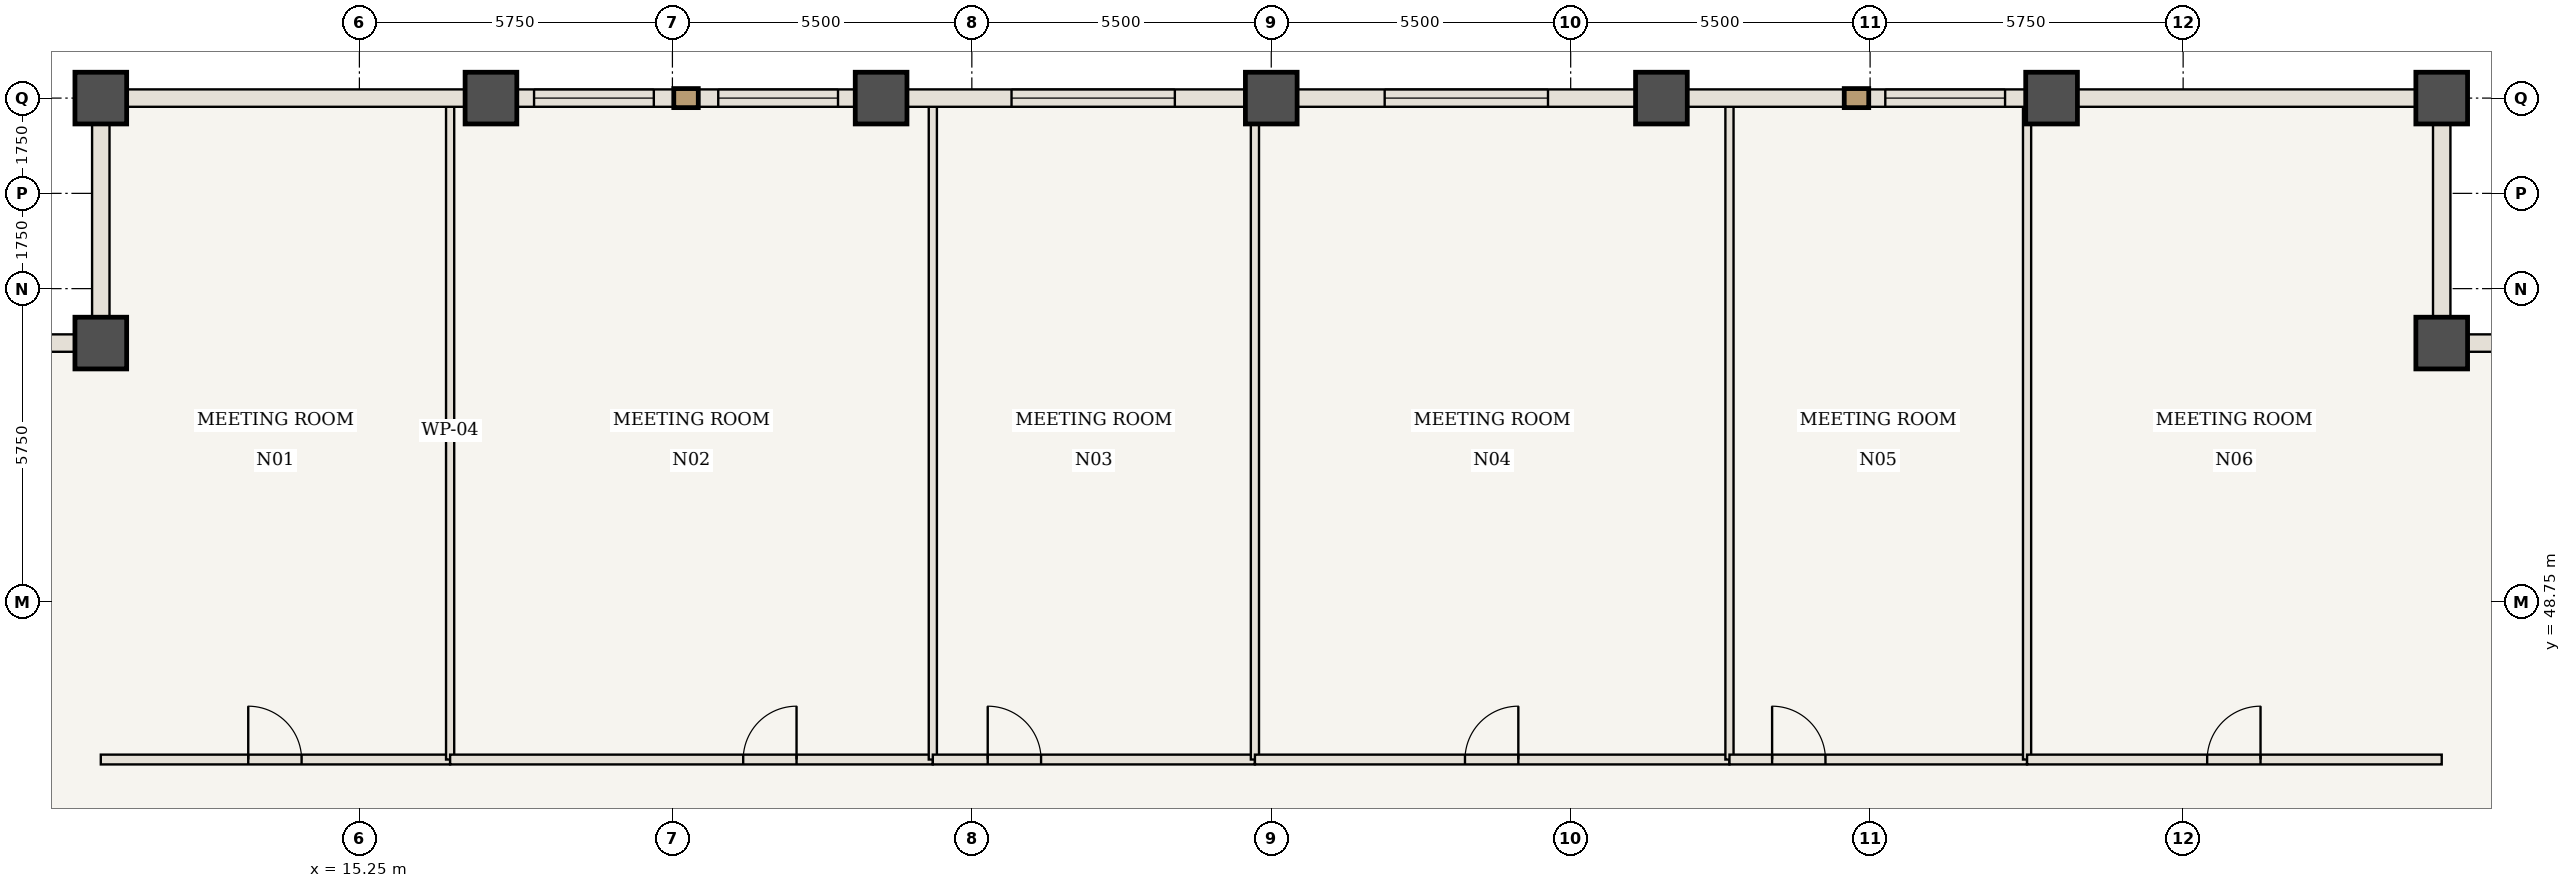
"""IFC4 building model, lengths in metres.
Left out: names, types, materials, properties, quantities, classifications, styles, units other than length and angle.
Written with IfcOpenShell. Run it as: python <this file> out.ifc"""

import sys

from ifc_helpers import new_model, si_unit, direction, frame, frame_2d, origin, origin_2d, place, context, subcontext, project, spatial, rectangle, extrude, element, fill, save


model = new_model("IFC4")
c1 = context("Model", 3, precision=1e-05, world=origin(), true_north=direction((0.0, 1.0)))
c2 = subcontext(c1, "Body", "Model", "MODEL_VIEW")
j1 = project(units=[si_unit("LENGTHUNIT", "METRE"), si_unit("PLANEANGLEUNIT", "RADIAN")], contexts=[c1])
p1 = place(None, origin())
s1 = spatial("IfcSite", under=j1, at=p1, CompositionType="ELEMENT")
p2 = place(p1, origin())
s2 = spatial("IfcBuilding", under=s1, at=p2, CompositionType="ELEMENT")
p3 = place(p2, frame((0.0, 0.0, 168.35)))
s3 = spatial("IfcBuildingStorey", under=s2, at=p3, CompositionType="ELEMENT", Elevation=168.35)
for number, where, z_axis, x_axis in (
    (1, (53.5, 53.5, 0.0), (0.0, 0.0, 1.0), (1.0, 0.0, 0.0)),
    (2, (53.5, 58.0, 0.0), (0.0, 0.0, 1.0), (1.0, 0.0, 0.0)),
    (3, (10.5, 58.0, 0.0), (0.0, 0.0, 1.0), (1.0, 0.0, 0.0)),
    (4, (10.5, 53.5, 0.0), (0.0, 0.0, 1.0), (1.0, 0.0, 0.0)),
    (5, (17.667, 58.0, 0.0), (0.0, 0.0, 1.0), (1.0, 0.0, 0.0)),
    (6, (24.833, 58.0, 0.0), (0.0, 0.0, 1.0), (1.0, 0.0, 0.0)),
    (7, (32.0, 58.0, 0.0), (0.0, 0.0, 1.0), (1.0, 0.0, 0.0)),
    (8, (39.167, 58.0, 0.0), (0.0, 0.0, 1.0), (1.0, 0.0, 0.0)),
    (9, (46.333, 58.0, 0.0), (0.0, 0.0, 1.0), (1.0, 0.0, 0.0)),
):
    element("IfcColumn", number, at=place(p3, frame(where, z_axis=z_axis, x_axis=x_axis)), inside=s3, PredefinedType="COLUMN", context=c2, shape_type="SweptSolid", body=[
        extrude(rectangle(XDim=0.95, YDim=0.95, at=origin_2d()), origin(), (0.0, 0.0, 1.0), 3.85),
    ])
p4 = place(p3, frame((10.5, 45.85, 0.0), z_axis=(0.0, 0.0, 1.0), x_axis=(1.0, 0.0, 0.0)))
e10 = element("IfcWall", 10, at=p4, inside=s3, PredefinedType="STANDARD", context=c2, shape_type="SweptSolid", body=[
    extrude(rectangle(XDim=6.417, YDim=0.18, at=frame_2d((3.208, 0.0))), origin(), (0.0, 0.0, 1.0), 3.685),
])
p5 = place(p4, frame((2.708, 0.0, 0.0)))
e11 = element("IfcOpeningElement", 11, at=p5, cuts=e10, PredefinedType="OPENING", context=c2, shape_type="SweptSolid", body=[
    extrude(rectangle(XDim=0.98, YDim=2.2, at=frame_2d((0.49, 1.1))), frame((0.0, 0.1, 0.0), z_axis=(0.0, -1.0, 0.0), x_axis=(1.0, 0.0, 0.0)), (0.0, 0.0, 1.0), 0.2),
])
p6 = place(p3, frame((16.917, 45.85, 0.0), z_axis=(0.0, 0.0, 1.0), x_axis=(0.0, 1.0, 0.0)))
e12 = element("IfcWall", 12, at=p6, inside=s3, PredefinedType="STANDARD", context=c2, shape_type="SweptSolid", body=[
    extrude(rectangle(XDim=12.09, YDim=0.15, at=frame_2d((6.045, 0.0))), origin(), (0.0, 0.0, 1.0), 3.685),
])
p7 = place(p3, frame((16.917, 45.85, 0.0), z_axis=(0.0, 0.0, 1.0), x_axis=(1.0, 0.0, 0.0)))
e13 = element("IfcWall", 13, at=p7, inside=s3, PredefinedType="STANDARD", context=c2, shape_type="SweptSolid", body=[
    extrude(rectangle(XDim=8.866, YDim=0.18, at=frame_2d((4.433, 0.0))), origin(), (0.0, 0.0, 1.0), 3.685),
])
p8 = place(p7, frame((5.383, 0.0, 0.0)))
e14 = element("IfcOpeningElement", 14, at=p8, cuts=e13, PredefinedType="OPENING", context=c2, shape_type="SweptSolid", body=[
    extrude(rectangle(XDim=0.98, YDim=2.2, at=frame_2d((0.49, 1.1))), frame((0.0, 0.1, 0.0), z_axis=(0.0, -1.0, 0.0), x_axis=(1.0, 0.0, 0.0)), (0.0, 0.0, 1.0), 0.2),
])
p9 = place(p3, frame((25.783, 45.85, 0.0), z_axis=(0.0, 0.0, 1.0), x_axis=(0.0, 1.0, 0.0)))
e15 = element("IfcWall", 15, at=p9, inside=s3, PredefinedType="STANDARD", context=c2, shape_type="SweptSolid", body=[
    extrude(rectangle(XDim=12.09, YDim=0.15, at=frame_2d((6.045, 0.0))), origin(), (0.0, 0.0, 1.0), 3.685),
])
p10 = place(p3, frame((25.783, 45.85, 0.0), z_axis=(0.0, 0.0, 1.0), x_axis=(1.0, 0.0, 0.0)))
e16 = element("IfcWall", 16, at=p10, inside=s3, PredefinedType="STANDARD", context=c2, shape_type="SweptSolid", body=[
    extrude(rectangle(XDim=5.917, YDim=0.18, at=frame_2d((2.958, 0.0))), origin(), (0.0, 0.0, 1.0), 3.685),
])
p11 = place(p10, frame((1.008, 0.0, 0.0)))
e17 = element("IfcOpeningElement", 17, at=p11, cuts=e16, PredefinedType="OPENING", context=c2, shape_type="SweptSolid", body=[
    extrude(rectangle(XDim=0.98, YDim=2.2, at=frame_2d((0.49, 1.1))), frame((0.0, 0.1, 0.0), z_axis=(0.0, -1.0, 0.0), x_axis=(1.0, 0.0, 0.0)), (0.0, 0.0, 1.0), 0.2),
])
p12 = place(p3, frame((31.7, 45.85, 0.0), z_axis=(0.0, 0.0, 1.0), x_axis=(0.0, 1.0, 0.0)))
e18 = element("IfcWall", 18, at=p12, inside=s3, PredefinedType="STANDARD", context=c2, shape_type="SweptSolid", body=[
    extrude(rectangle(XDim=12.09, YDim=0.15, at=frame_2d((6.045, 0.0))), origin(), (0.0, 0.0, 1.0), 3.685),
])
p13 = place(p3, frame((31.7, 45.85, 0.0), z_axis=(0.0, 0.0, 1.0), x_axis=(1.0, 0.0, 0.0)))
e19 = element("IfcWall", 19, at=p13, inside=s3, PredefinedType="STANDARD", context=c2, shape_type="SweptSolid", body=[
    extrude(rectangle(XDim=8.717, YDim=0.18, at=frame_2d((4.358, 0.0))), origin(), (0.0, 0.0, 1.0), 3.685),
])
p14 = place(p13, frame((3.858, 0.0, 0.0)))
e20 = element("IfcOpeningElement", 20, at=p14, cuts=e19, PredefinedType="OPENING", context=c2, shape_type="SweptSolid", body=[
    extrude(rectangle(XDim=0.98, YDim=2.2, at=frame_2d((0.49, 1.1))), frame((0.0, 0.1, 0.0), z_axis=(0.0, -1.0, 0.0), x_axis=(1.0, 0.0, 0.0)), (0.0, 0.0, 1.0), 0.2),
])
p15 = place(p3, frame((40.417, 45.85, 0.0), z_axis=(0.0, 0.0, 1.0), x_axis=(0.0, 1.0, 0.0)))
e21 = element("IfcWall", 21, at=p15, inside=s3, PredefinedType="STANDARD", context=c2, shape_type="SweptSolid", body=[
    extrude(rectangle(XDim=12.09, YDim=0.15, at=frame_2d((6.045, 0.0))), origin(), (0.0, 0.0, 1.0), 3.685),
])
p16 = place(p3, frame((40.417, 45.85, 0.0), z_axis=(0.0, 0.0, 1.0), x_axis=(1.0, 0.0, 0.0)))
e22 = element("IfcWall", 22, at=p16, inside=s3, PredefinedType="STANDARD", context=c2, shape_type="SweptSolid", body=[
    extrude(rectangle(XDim=5.467, YDim=0.18, at=frame_2d((2.733, 0.0))), origin(), (0.0, 0.0, 1.0), 3.685),
])
p17 = place(p16, frame((0.783, 0.0, 0.0)))
e23 = element("IfcOpeningElement", 23, at=p17, cuts=e22, PredefinedType="OPENING", context=c2, shape_type="SweptSolid", body=[
    extrude(rectangle(XDim=0.98, YDim=2.2, at=frame_2d((0.49, 1.1))), frame((0.0, 0.1, 0.0), z_axis=(0.0, -1.0, 0.0), x_axis=(1.0, 0.0, 0.0)), (0.0, 0.0, 1.0), 0.2),
])
p18 = place(p3, frame((45.883, 45.85, 0.0), z_axis=(0.0, 0.0, 1.0), x_axis=(0.0, 1.0, 0.0)))
e24 = element("IfcWall", 24, at=p18, inside=s3, PredefinedType="STANDARD", context=c2, shape_type="SweptSolid", body=[
    extrude(rectangle(XDim=12.09, YDim=0.15, at=frame_2d((6.045, 0.0))), origin(), (0.0, 0.0, 1.0), 3.685),
])
p19 = place(p3, frame((45.883, 45.85, 0.0), z_axis=(0.0, 0.0, 1.0), x_axis=(1.0, 0.0, 0.0)))
e25 = element("IfcWall", 25, at=p19, inside=s3, PredefinedType="STANDARD", context=c2, shape_type="SweptSolid", body=[
    extrude(rectangle(XDim=7.617, YDim=0.18, at=frame_2d((3.808, 0.0))), origin(), (0.0, 0.0, 1.0), 3.685),
])
p20 = place(p19, frame((3.308, 0.0, 0.0)))
e26 = element("IfcOpeningElement", 26, at=p20, cuts=e25, PredefinedType="OPENING", context=c2, shape_type="SweptSolid", body=[
    extrude(rectangle(XDim=0.98, YDim=2.2, at=frame_2d((0.49, 1.1))), frame((0.0, 0.1, 0.0), z_axis=(0.0, -1.0, 0.0), x_axis=(1.0, 0.0, 0.0)), (0.0, 0.0, 1.0), 0.2),
])
p21 = place(p3, frame((10.5, 58.0, 0.0), z_axis=(0.0, 0.0, 1.0), x_axis=(1.0, 0.0, 0.0)))
e27 = element("IfcWall", 27, at=p21, inside=s3, PredefinedType="USERDEFINED", context=c2, shape_type="SweptSolid", body=[
    extrude(rectangle(XDim=7.167, YDim=0.32, at=frame_2d((3.583, 0.0))), origin(), (0.0, 0.0, 1.0), 2.885),
])
p22 = place(p3, frame((17.667, 58.0, 0.0), z_axis=(0.0, 0.0, 1.0), x_axis=(1.0, 0.0, 0.0)))
e28 = element("IfcWall", 28, at=p22, inside=s3, PredefinedType="USERDEFINED", context=c2, shape_type="SweptSolid", body=[
    extrude(rectangle(XDim=7.167, YDim=0.32, at=frame_2d((3.583, 0.0))), origin(), (0.0, 0.0, 1.0), 2.885),
])
p23 = place(p22, frame((0.792, 0.0, 0.85)))
e29 = element("IfcOpeningElement", 29, at=p23, cuts=e28, PredefinedType="OPENING", context=c2, shape_type="SweptSolid", body=[
    extrude(rectangle(XDim=2.2, YDim=1.835, at=frame_2d((1.1, 0.917))), frame((0.0, 0.17, 0.0), z_axis=(0.0, -1.0, 0.0), x_axis=(1.0, 0.0, 0.0)), (0.0, 0.0, 1.0), 0.34),
])
p24 = place(p22, frame((4.175, 0.0, 0.85)))
e30 = element("IfcOpeningElement", 30, at=p24, cuts=e28, PredefinedType="OPENING", context=c2, shape_type="SweptSolid", body=[
    extrude(rectangle(XDim=2.2, YDim=1.835, at=frame_2d((1.1, 0.917))), frame((0.0, 0.17, 0.0), z_axis=(0.0, -1.0, 0.0), x_axis=(1.0, 0.0, 0.0)), (0.0, 0.0, 1.0), 0.34),
])
p25 = place(p3, frame((24.833, 58.0, 0.0), z_axis=(0.0, 0.0, 1.0), x_axis=(1.0, 0.0, 0.0)))
e31 = element("IfcWall", 31, at=p25, inside=s3, PredefinedType="USERDEFINED", context=c2, shape_type="SweptSolid", body=[
    extrude(rectangle(XDim=7.167, YDim=0.32, at=frame_2d((3.583, 0.0))), origin(), (0.0, 0.0, 1.0), 2.885),
])
p26 = place(p25, frame((2.396, 0.0, 0.85)))
e32 = element("IfcOpeningElement", 32, at=p26, cuts=e31, PredefinedType="OPENING", context=c2, shape_type="SweptSolid", body=[
    extrude(rectangle(XDim=3.0, YDim=1.835, at=frame_2d((1.5, 0.917))), frame((0.0, 0.17, 0.0), z_axis=(0.0, -1.0, 0.0), x_axis=(1.0, 0.0, 0.0)), (0.0, 0.0, 1.0), 0.34),
])
p27 = place(p3, frame((32.0, 58.0, 0.0), z_axis=(0.0, 0.0, 1.0), x_axis=(1.0, 0.0, 0.0)))
e33 = element("IfcWall", 33, at=p27, inside=s3, PredefinedType="USERDEFINED", context=c2, shape_type="SweptSolid", body=[
    extrude(rectangle(XDim=7.167, YDim=0.32, at=frame_2d((3.583, 0.0))), origin(), (0.0, 0.0, 1.0), 2.885),
])
p28 = place(p27, frame((2.083, 0.0, 0.85)))
e34 = element("IfcOpeningElement", 34, at=p28, cuts=e33, PredefinedType="OPENING", context=c2, shape_type="SweptSolid", body=[
    extrude(rectangle(XDim=3.0, YDim=1.835, at=frame_2d((1.5, 0.917))), frame((0.0, 0.17, 0.0), z_axis=(0.0, -1.0, 0.0), x_axis=(1.0, 0.0, 0.0)), (0.0, 0.0, 1.0), 0.34),
])
p29 = place(p3, frame((39.167, 58.0, 0.0), z_axis=(0.0, 0.0, 1.0), x_axis=(1.0, 0.0, 0.0)))
e35 = element("IfcWall", 35, at=p29, inside=s3, PredefinedType="USERDEFINED", context=c2, shape_type="SweptSolid", body=[
    extrude(rectangle(XDim=7.167, YDim=0.32, at=frame_2d((3.583, 0.0))), origin(), (0.0, 0.0, 1.0), 2.885),
])
p30 = place(p29, frame((4.113, 0.0, 0.85)))
e36 = element("IfcOpeningElement", 36, at=p30, cuts=e35, PredefinedType="OPENING", context=c2, shape_type="SweptSolid", body=[
    extrude(rectangle(XDim=2.2, YDim=1.835, at=frame_2d((1.1, 0.917))), frame((0.0, 0.17, 0.0), z_axis=(0.0, -1.0, 0.0), x_axis=(1.0, 0.0, 0.0)), (0.0, 0.0, 1.0), 0.34),
])
p31 = place(p3, frame((46.333, 58.0, 0.0), z_axis=(0.0, 0.0, 1.0), x_axis=(1.0, 0.0, 0.0)))
e37 = element("IfcWall", 37, at=p31, inside=s3, PredefinedType="USERDEFINED", context=c2, shape_type="SweptSolid", body=[
    extrude(rectangle(XDim=7.167, YDim=0.32, at=frame_2d((3.583, 0.0))), origin(), (0.0, 0.0, 1.0), 2.885),
])
for number, where, z_axis, x_axis in (
    (38, (53.5, 53.5, 0.0), (0.0, 0.0, 1.0), (1.0, 0.0, 0.0)),
    (39, (53.5, 58.0, 0.0), (0.0, 0.0, 1.0), (0.0, -1.0, 0.0)),
    (40, (10.5, 53.5, 0.0), (0.0, 0.0, 1.0), (0.0, 1.0, 0.0)),
    (41, (6.0, 53.5, 0.0), (0.0, 0.0, 1.0), (1.0, 0.0, 0.0)),
):
    element("IfcWall", number, at=place(p3, frame(where, z_axis=z_axis, x_axis=x_axis)), inside=s3, PredefinedType="USERDEFINED", context=c2, shape_type="SweptSolid", body=[
        extrude(rectangle(XDim=4.5, YDim=0.32, at=frame_2d((2.25, 0.0))), origin(), (0.0, 0.0, 1.0), 2.885),
    ])
p32 = place(p5, origin())
e42 = element("IfcDoor", 42, at=p32, inside=s3, OperationType="SINGLE_SWING_LEFT", PredefinedType="DOOR", context=c2, shape_type="SweptSolid", body=[
    extrude(rectangle(XDim=0.98, YDim=2.2, at=frame_2d((0.49, 1.1))), frame((0.0, 0.025, 0.0), z_axis=(0.0, -1.0, 0.0), x_axis=(1.0, 0.0, 0.0)), (0.0, 0.0, 1.0), 0.05),
])
fill(e11, e42)
p33 = place(p8, origin())
e43 = element("IfcDoor", 43, at=p33, inside=s3, OperationType="SINGLE_SWING_RIGHT", PredefinedType="DOOR", context=c2, shape_type="SweptSolid", body=[
    extrude(rectangle(XDim=0.98, YDim=2.2, at=frame_2d((0.49, 1.1))), frame((0.0, 0.025, 0.0), z_axis=(0.0, -1.0, 0.0), x_axis=(1.0, 0.0, 0.0)), (0.0, 0.0, 1.0), 0.05),
])
fill(e14, e43)
p34 = place(p11, origin())
e44 = element("IfcDoor", 44, at=p34, inside=s3, OperationType="SINGLE_SWING_LEFT", PredefinedType="DOOR", context=c2, shape_type="SweptSolid", body=[
    extrude(rectangle(XDim=0.98, YDim=2.2, at=frame_2d((0.49, 1.1))), frame((0.0, 0.025, 0.0), z_axis=(0.0, -1.0, 0.0), x_axis=(1.0, 0.0, 0.0)), (0.0, 0.0, 1.0), 0.05),
])
fill(e17, e44)
p35 = place(p14, origin())
e45 = element("IfcDoor", 45, at=p35, inside=s3, OperationType="SINGLE_SWING_RIGHT", PredefinedType="DOOR", context=c2, shape_type="SweptSolid", body=[
    extrude(rectangle(XDim=0.98, YDim=2.2, at=frame_2d((0.49, 1.1))), frame((0.0, 0.025, 0.0), z_axis=(0.0, -1.0, 0.0), x_axis=(1.0, 0.0, 0.0)), (0.0, 0.0, 1.0), 0.05),
])
fill(e20, e45)
p36 = place(p17, origin())
e46 = element("IfcDoor", 46, at=p36, inside=s3, OperationType="SINGLE_SWING_LEFT", PredefinedType="DOOR", context=c2, shape_type="SweptSolid", body=[
    extrude(rectangle(XDim=0.98, YDim=2.2, at=frame_2d((0.49, 1.1))), frame((0.0, 0.025, 0.0), z_axis=(0.0, -1.0, 0.0), x_axis=(1.0, 0.0, 0.0)), (0.0, 0.0, 1.0), 0.05),
])
fill(e23, e46)
p37 = place(p20, origin())
e47 = element("IfcDoor", 47, at=p37, inside=s3, OperationType="SINGLE_SWING_RIGHT", PredefinedType="DOOR", context=c2, shape_type="SweptSolid", body=[
    extrude(rectangle(XDim=0.98, YDim=2.2, at=frame_2d((0.49, 1.1))), frame((0.0, 0.025, 0.0), z_axis=(0.0, -1.0, 0.0), x_axis=(1.0, 0.0, 0.0)), (0.0, 0.0, 1.0), 0.05),
])
fill(e26, e47)
p38 = place(p23, origin())
e48 = element("IfcWindow", 48, at=p38, inside=s3, PartitioningType="SINGLE_PANEL", PredefinedType="WINDOW", context=c2, shape_type="SweptSolid", body=[
    extrude(rectangle(XDim=2.2, YDim=1.835, at=frame_2d((1.1, 0.917))), frame((0.0, 0.03, 0.0), z_axis=(0.0, -1.0, 0.0), x_axis=(1.0, 0.0, 0.0)), (0.0, 0.0, 1.0), 0.06),
])
fill(e29, e48)
p39 = place(p24, origin())
e49 = element("IfcWindow", 49, at=p39, inside=s3, PartitioningType="SINGLE_PANEL", PredefinedType="WINDOW", context=c2, shape_type="SweptSolid", body=[
    extrude(rectangle(XDim=2.2, YDim=1.835, at=frame_2d((1.1, 0.917))), frame((0.0, 0.03, 0.0), z_axis=(0.0, -1.0, 0.0), x_axis=(1.0, 0.0, 0.0)), (0.0, 0.0, 1.0), 0.06),
])
fill(e30, e49)
p40 = place(p26, origin())
e50 = element("IfcWindow", 50, at=p40, inside=s3, PartitioningType="SINGLE_PANEL", PredefinedType="WINDOW", context=c2, shape_type="SweptSolid", body=[
    extrude(rectangle(XDim=3.0, YDim=1.835, at=frame_2d((1.5, 0.917))), frame((0.0, 0.03, 0.0), z_axis=(0.0, -1.0, 0.0), x_axis=(1.0, 0.0, 0.0)), (0.0, 0.0, 1.0), 0.06),
])
fill(e32, e50)
p41 = place(p28, origin())
e51 = element("IfcWindow", 51, at=p41, inside=s3, PartitioningType="SINGLE_PANEL", PredefinedType="WINDOW", context=c2, shape_type="SweptSolid", body=[
    extrude(rectangle(XDim=3.0, YDim=1.835, at=frame_2d((1.5, 0.917))), frame((0.0, 0.03, 0.0), z_axis=(0.0, -1.0, 0.0), x_axis=(1.0, 0.0, 0.0)), (0.0, 0.0, 1.0), 0.06),
])
fill(e34, e51)
p42 = place(p30, origin())
e52 = element("IfcWindow", 52, at=p42, inside=s3, PartitioningType="SINGLE_PANEL", PredefinedType="WINDOW", context=c2, shape_type="SweptSolid", body=[
    extrude(rectangle(XDim=2.2, YDim=1.835, at=frame_2d((1.1, 0.917))), frame((0.0, 0.03, 0.0), z_axis=(0.0, -1.0, 0.0), x_axis=(1.0, 0.0, 0.0)), (0.0, 0.0, 1.0), 0.06),
])
fill(e36, e52)
save(model, sys.argv[1])
